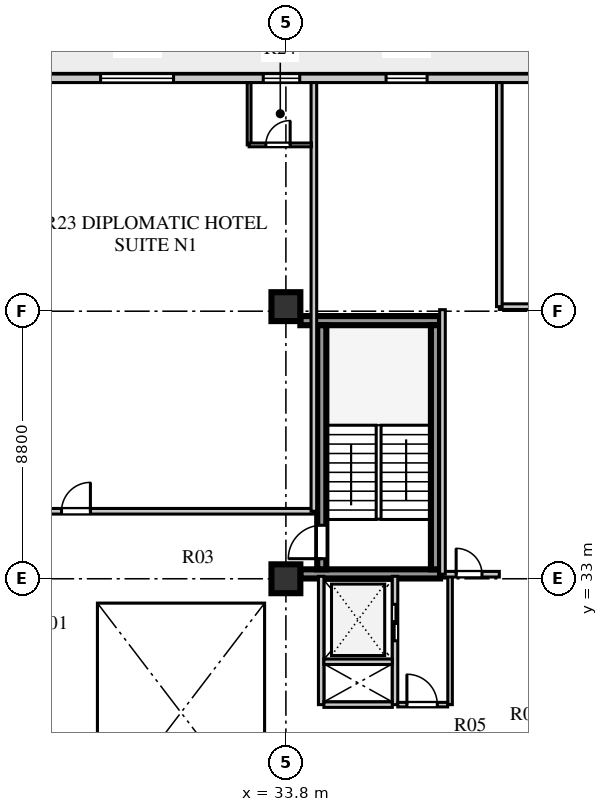
"""IFC4 building model, lengths in metres.
Left out: names, types, materials, properties, quantities, classifications, styles, units other than length and angle.
Written with IfcOpenShell. Run it as: python <this file> out.ifc"""

import sys

from ifc_helpers import new_model, si_unit, direction, frame, frame_2d, origin, origin_2d, place, context, subcontext, project, spatial, rectangle, extrude, element, fill, save


model = new_model("IFC4")
c1 = context("Model", 3, precision=1e-05, world=origin(), true_north=direction((0.0, 1.0)))
c2 = subcontext(c1, "Body", "Model", "MODEL_VIEW")
j1 = project(units=[si_unit("LENGTHUNIT", "METRE"), si_unit("PLANEANGLEUNIT", "RADIAN")], contexts=[c1])
p1 = place(None, origin())
s1 = spatial("IfcSite", under=j1, at=p1, CompositionType="ELEMENT")
p2 = place(p1, origin())
s2 = spatial("IfcBuilding", under=s1, at=p2, CompositionType="ELEMENT")
p3 = place(p2, frame((0.0, 0.0, 157.9)))
s3 = spatial("IfcBuildingStorey", under=s2, at=p3, CompositionType="ELEMENT", Elevation=157.9)
for number, where, z_axis, x_axis in (
    (1, (34.275, 33.16, 0.0), (0.0, 0.0, 1.0), (1.0, 0.0, 0.0)),
    (2, (34.275, 41.49, 0.0), (0.0, 0.0, 1.0), (1.0, 0.0, 0.0)),
):
    element("IfcWall", number, at=place(p3, frame(where, z_axis=z_axis, x_axis=x_axis)), inside=s3, PredefinedType="SHEAR", context=c2, shape_type="SweptSolid", body=[
        extrude(rectangle(XDim=4.595, YDim=0.3, at=frame_2d((2.298, 0.0))), origin(), (0.0, 0.0, 1.0), 3.6),
    ])
p4 = place(p3, frame((34.98, 33.31, 0.0), z_axis=(0.0, 0.0, 1.0), x_axis=(0.0, 1.0, 0.0)))
e3 = element("IfcWall", 3, at=p4, inside=s3, PredefinedType="SHEAR", context=c2, shape_type="SweptSolid", body=[
    extrude(rectangle(XDim=8.03, YDim=0.3, at=frame_2d((4.015, 0.0))), origin(), (0.0, 0.0, 1.0), 3.6),
])
p5 = place(p4, frame((0.35, 0.0, 0.0)))
e4 = element("IfcOpeningElement", 4, at=p5, cuts=e3, PredefinedType="OPENING", context=c2, shape_type="SweptSolid", body=[
    extrude(rectangle(XDim=1.1, YDim=2.1, at=frame_2d((0.55, 1.05))), frame((0.0, 0.16, 0.0), z_axis=(0.0, -1.0, 0.0), x_axis=(1.0, 0.0, 0.0)), (0.0, 0.0, 1.0), 0.32),
])
p6 = place(p3, frame((38.72, 33.31, 0.0), z_axis=(0.0, 0.0, 1.0), x_axis=(0.0, 1.0, 0.0)))
e5 = element("IfcWall", 5, at=p6, inside=s3, PredefinedType="SHEAR", context=c2, shape_type="SweptSolid", body=[
    extrude(rectangle(XDim=8.03, YDim=0.3, at=frame_2d((4.015, 0.0))), origin(), (0.0, 0.0, 1.0), 3.6),
])
for number, where, z_axis, x_axis in (
    (6, (33.8, 33.0, 0.0), (0.0, 0.0, 1.0), (1.0, 0.0, 0.0)),
    (7, (33.8, 41.95, 0.0), (0.0, 0.0, 1.0), (1.0, 0.0, 0.0)),
):
    element("IfcColumn", number, at=place(p3, frame(where, z_axis=z_axis, x_axis=x_axis)), inside=s3, PredefinedType="COLUMN", context=c2, shape_type="SweptSolid", body=[
        extrude(rectangle(XDim=0.95, YDim=0.95, at=origin_2d()), origin(), (0.0, 0.0, 1.0), 3.6),
    ])
p7 = place(p3, frame((45.55, 49.46, 0.0), z_axis=(0.0, 0.0, 1.0), x_axis=(-1.0, 0.0, 0.0)))
e8 = element("IfcWall", 8, at=p7, inside=s3, PredefinedType="STANDARD", context=c2, shape_type="SweptSolid", body=[
    extrude(rectangle(XDim=32.5, YDim=0.28, at=frame_2d((16.25, 0.0))), origin(), (0.0, 0.0, 1.0), 3.6),
])
p8 = place(p7, frame((30.55, 0.0, 0.0)))
e9 = element("IfcOpeningElement", 9, at=p8, cuts=e8, PredefinedType="OPENING", context=c2, shape_type="SweptSolid", body=[
    extrude(rectangle(XDim=1.0, YDim=2.05, at=frame_2d((0.5, 1.025))), frame((0.0, 0.15, 0.0), z_axis=(0.0, -1.0, 0.0), x_axis=(1.0, 0.0, 0.0)), (0.0, 0.0, 1.0), 0.3),
])
p9 = place(p7, frame((24.87, 0.0, 0.8)))
e10 = element("IfcOpeningElement", 10, at=p9, cuts=e8, PredefinedType="OPENING", context=c2, shape_type="SweptSolid", body=[
    extrude(rectangle(XDim=1.2, YDim=1.75, at=frame_2d((0.6, 0.875))), frame((0.0, 0.15, 0.0), z_axis=(0.0, -1.0, 0.0), x_axis=(1.0, 0.0, 0.0)), (0.0, 0.0, 1.0), 0.3),
])
p10 = place(p7, frame((15.445, 0.0, 0.8)))
e11 = element("IfcOpeningElement", 11, at=p10, cuts=e8, PredefinedType="OPENING", context=c2, shape_type="SweptSolid", body=[
    extrude(rectangle(XDim=2.4, YDim=2.05, at=frame_2d((1.2, 1.025))), frame((0.0, 0.15, 0.0), z_axis=(0.0, -1.0, 0.0), x_axis=(1.0, 0.0, 0.0)), (0.0, 0.0, 1.0), 0.3),
])
p11 = place(p7, frame((11.295, 0.0, 0.8)))
e12 = element("IfcOpeningElement", 12, at=p11, cuts=e8, PredefinedType="OPENING", context=c2, shape_type="SweptSolid", body=[
    extrude(rectangle(XDim=1.2, YDim=1.75, at=frame_2d((0.6, 0.875))), frame((0.0, 0.15, 0.0), z_axis=(0.0, -1.0, 0.0), x_axis=(1.0, 0.0, 0.0)), (0.0, 0.0, 1.0), 0.3),
])
p12 = place(p7, frame((7.105, 0.0, 0.8)))
e13 = element("IfcOpeningElement", 13, at=p12, cuts=e8, PredefinedType="OPENING", context=c2, shape_type="SweptSolid", body=[
    extrude(rectangle(XDim=1.35, YDim=1.9, at=frame_2d((0.675, 0.95))), frame((0.0, 0.15, 0.0), z_axis=(0.0, -1.0, 0.0), x_axis=(1.0, 0.0, 0.0)), (0.0, 0.0, 1.0), 0.3),
])
p13 = place(p7, frame((1.595, 0.0, 0.8)))
e14 = element("IfcOpeningElement", 14, at=p13, cuts=e8, PredefinedType="OPENING", context=c2, shape_type="SweptSolid", body=[
    extrude(rectangle(XDim=1.65, YDim=1.95, at=frame_2d((0.825, 0.975))), frame((0.0, 0.15, 0.0), z_axis=(0.0, -1.0, 0.0), x_axis=(1.0, 0.0, 0.0)), (0.0, 0.0, 1.0), 0.3),
])
p14 = place(p3, frame((34.96, 28.86, 0.0), z_axis=(0.0, 0.0, 1.0), x_axis=(0.0, 1.0, 0.0)))
e15 = element("IfcWall", 15, at=p14, inside=s3, PredefinedType="SOLIDWALL", context=c2, shape_type="SweptSolid", body=[
    extrude(rectangle(XDim=4.22, YDim=0.18, at=frame_2d((2.11, 0.0))), origin(), (0.0, 0.0, 1.0), 3.6),
])
p15 = place(p3, frame((37.39, 28.86, 0.0), z_axis=(0.0, 0.0, 1.0), x_axis=(0.0, 1.0, 0.0)))
e16 = element("IfcWall", 16, at=p15, inside=s3, PredefinedType="SOLIDWALL", context=c2, shape_type="SweptSolid", body=[
    extrude(rectangle(XDim=4.22, YDim=0.18, at=frame_2d((2.11, 0.0))), origin(), (0.0, 0.0, 1.0), 3.6),
])
p16 = place(p15, frame((2.1, 0.0, 0.0)))
e17 = element("IfcOpeningElement", 17, at=p16, cuts=e16, PredefinedType="OPENING", context=c2, shape_type="SweptSolid", body=[
    extrude(rectangle(XDim=1.2, YDim=2.12, at=frame_2d((0.6, 1.06))), frame((0.0, 0.1, 0.0), z_axis=(0.0, -1.0, 0.0), x_axis=(1.0, 0.0, 0.0)), (0.0, 0.0, 1.0), 0.2),
])
for number, where, z_axis, x_axis in (
    (18, (35.05, 28.86, 0.0), (0.0, 0.0, 1.0), (1.0, 0.0, 0.0)),
    (19, (35.05, 30.27, 0.0), (0.0, 0.0, 1.0), (1.0, 0.0, 0.0)),
):
    element("IfcWall", number, at=place(p3, frame(where, z_axis=z_axis, x_axis=x_axis)), inside=s3, PredefinedType="SOLIDWALL", context=c2, shape_type="SweptSolid", body=[
        extrude(rectangle(XDim=2.25, YDim=0.18, at=frame_2d((1.125, 0.0))), origin(), (0.0, 0.0, 1.0), 3.6),
    ])
p17 = place(p3, frame((39.2, 28.86, 0.0), z_axis=(0.0, 0.0, 1.0), x_axis=(0.0, 1.0, 0.0)))
e20 = element("IfcWall", 20, at=p17, inside=s3, PredefinedType="PARTITIONING", context=c2, shape_type="SweptSolid", body=[
    extrude(rectangle(XDim=4.22, YDim=0.15, at=frame_2d((2.11, 0.0))), origin(), (0.0, 0.0, 1.0), 3.6),
])
p18 = place(p3, frame((37.48, 28.86, 0.0), z_axis=(0.0, 0.0, 1.0), x_axis=(1.0, 0.0, 0.0)))
e21 = element("IfcWall", 21, at=p18, inside=s3, PredefinedType="PARTITIONING", context=c2, shape_type="SweptSolid", body=[
    extrude(rectangle(XDim=1.64, YDim=0.15, at=frame_2d((0.82, 0.0))), origin(), (0.0, 0.0, 1.0), 3.6),
])
p19 = place(p18, frame((0.3, 0.0, 0.0)))
e22 = element("IfcOpeningElement", 22, at=p19, cuts=e21, PredefinedType="OPENING", context=c2, shape_type="SweptSolid", body=[
    extrude(rectangle(XDim=1.0, YDim=2.1, at=frame_2d((0.5, 1.05))), frame((0.0, 0.085, 0.0), z_axis=(0.0, -1.0, 0.0), x_axis=(1.0, 0.0, 0.0)), (0.0, 0.0, 1.0), 0.17),
])
p20 = place(p3, frame((25.22, 35.22, 0.0), z_axis=(0.0, 0.0, 1.0), x_axis=(1.0, 0.0, 0.0)))
e23 = element("IfcWall", 23, at=p20, inside=s3, PredefinedType="SOLIDWALL", context=c2, shape_type="SweptSolid", body=[
    extrude(rectangle(XDim=9.5, YDim=0.185, at=frame_2d((4.75, 0.0))), origin(), (0.0, 0.0, 1.0), 3.6),
])
p21 = place(p20, frame((1.2, 0.0, 0.0)))
e24 = element("IfcOpeningElement", 24, at=p21, cuts=e23, PredefinedType="OPENING", context=c2, shape_type="SweptSolid", body=[
    extrude(rectangle(XDim=0.95, YDim=2.1, at=frame_2d((0.475, 1.05))), frame((0.0, 0.103, 0.0), z_axis=(0.0, -1.0, 0.0), x_axis=(1.0, 0.0, 0.0)), (0.0, 0.0, 1.0), 0.205),
])
p22 = place(p3, frame((40.82, 41.95, 0.0), z_axis=(0.0, 0.0, 1.0), x_axis=(1.0, 0.0, 0.0)))
e25 = element("IfcWall", 25, at=p22, inside=s3, PredefinedType="SOLIDWALL", context=c2, shape_type="SweptSolid", body=[
    extrude(rectangle(XDim=9.7, YDim=0.185, at=frame_2d((4.85, 0.0))), origin(), (0.0, 0.0, 1.0), 2.95),
])
p23 = place(p3, frame((34.72, 35.22, 0.0), z_axis=(0.0, 0.0, 1.0), x_axis=(0.0, 1.0, 0.0)))
e26 = element("IfcWall", 26, at=p23, inside=s3, PredefinedType="SOLIDWALL", context=c2, shape_type="SweptSolid", body=[
    extrude(rectangle(XDim=14.1, YDim=0.185, at=frame_2d((7.05, 0.0))), origin(), (0.0, 0.0, 1.0), 3.6),
])
p24 = place(p3, frame((32.59, 47.27, 0.0), z_axis=(0.0, 0.0, 1.0), x_axis=(0.0, 1.0, 0.0)))
e27 = element("IfcWall", 27, at=p24, inside=s3, PredefinedType="PLUMBINGWALL", context=c2, shape_type="SweptSolid", body=[
    extrude(rectangle(XDim=2.05, YDim=0.125, at=frame_2d((1.025, 0.0))), origin(), (0.0, 0.0, 1.0), 3.6),
])
p25 = place(p3, frame((32.59, 47.27, 0.0), z_axis=(0.0, 0.0, 1.0), x_axis=(1.0, 0.0, 0.0)))
e28 = element("IfcWall", 28, at=p25, inside=s3, PredefinedType="PLUMBINGWALL", context=c2, shape_type="SweptSolid", body=[
    extrude(rectangle(XDim=2.05, YDim=0.125, at=frame_2d((1.025, 0.0))), origin(), (0.0, 0.0, 1.0), 3.6),
])
p26 = place(p25, frame((0.55, 0.0, 0.0)))
e29 = element("IfcOpeningElement", 29, at=p26, cuts=e28, PredefinedType="OPENING", context=c2, shape_type="SweptSolid", body=[
    extrude(rectangle(XDim=0.8, YDim=2.05, at=frame_2d((0.4, 1.025))), frame((0.0, 0.073, 0.0), z_axis=(0.0, -1.0, 0.0), x_axis=(1.0, 0.0, 0.0)), (0.0, 0.0, 1.0), 0.145),
])
p27 = place(p3, frame((38.95, 33.15, 0.0), z_axis=(0.0, 0.0, 1.0), x_axis=(1.0, 0.0, 0.0)))
e30 = element("IfcWall", 30, at=p27, inside=s3, PredefinedType="SOLIDWALL", context=c2, shape_type="SweptSolid", body=[
    extrude(rectangle(XDim=1.87, YDim=0.185, at=frame_2d((0.935, 0.0))), origin(), (0.0, 0.0, 1.0), 3.6),
])
p28 = place(p27, frame((0.45, 0.0, 0.0)))
e31 = element("IfcOpeningElement", 31, at=p28, cuts=e30, PredefinedType="OPENING", context=c2, shape_type="SweptSolid", body=[
    extrude(rectangle(XDim=0.85, YDim=2.05, at=frame_2d((0.425, 1.025))), frame((0.0, 0.103, 0.0), z_axis=(0.0, -1.0, 0.0), x_axis=(1.0, 0.0, 0.0)), (0.0, 0.0, 1.0), 0.205),
])
p29 = place(p3, frame((38.95, 33.15, 0.0), z_axis=(0.0, 0.0, 1.0), x_axis=(0.0, 1.0, 0.0)))
e32 = element("IfcWall", 32, at=p29, inside=s3, PredefinedType="SOLIDWALL", context=c2, shape_type="SweptSolid", body=[
    extrude(rectangle(XDim=8.7, YDim=0.185, at=frame_2d((4.35, 0.0))), origin(), (0.0, 0.0, 1.0), 3.6),
])
p30 = place(p3, frame((40.82, 41.95, 0.0), z_axis=(0.0, 0.0, 1.0), x_axis=(0.0, 1.0, 0.0)))
e33 = element("IfcWall", 33, at=p30, inside=s3, PredefinedType="SOLIDWALL", context=c2, shape_type="SweptSolid", body=[
    extrude(rectangle(XDim=7.37, YDim=0.185, at=frame_2d((3.685, 0.0))), origin(), (0.0, 0.0, 1.0), 3.6),
])
p31 = place(p10, origin())
e34 = element("IfcWindow", 34, at=p31, inside=s3, PartitioningType="SINGLE_PANEL", PredefinedType="WINDOW", context=c2, shape_type="SweptSolid", body=[
    extrude(rectangle(XDim=2.4, YDim=2.05, at=frame_2d((1.2, 1.025))), frame((0.0, 0.03, 0.0), z_axis=(0.0, -1.0, 0.0), x_axis=(1.0, 0.0, 0.0)), (0.0, 0.0, 1.0), 0.06),
])
fill(e11, e34)
p32 = place(p11, origin())
e35 = element("IfcWindow", 35, at=p32, inside=s3, PartitioningType="SINGLE_PANEL", PredefinedType="WINDOW", context=c2, shape_type="SweptSolid", body=[
    extrude(rectangle(XDim=1.2, YDim=1.75, at=frame_2d((0.6, 0.875))), frame((0.0, 0.03, 0.0), z_axis=(0.0, -1.0, 0.0), x_axis=(1.0, 0.0, 0.0)), (0.0, 0.0, 1.0), 0.06),
])
fill(e12, e35)
p33 = place(p12, origin())
e36 = element("IfcWindow", 36, at=p33, inside=s3, PartitioningType="SINGLE_PANEL", PredefinedType="WINDOW", context=c2, shape_type="SweptSolid", body=[
    extrude(rectangle(XDim=1.35, YDim=1.9, at=frame_2d((0.675, 0.95))), frame((0.0, 0.03, 0.0), z_axis=(0.0, -1.0, 0.0), x_axis=(1.0, 0.0, 0.0)), (0.0, 0.0, 1.0), 0.06),
])
fill(e13, e36)
p34 = place(p5, origin())
e37 = element("IfcDoor", 37, at=p34, inside=s3, OperationType="SINGLE_SWING_LEFT", PredefinedType="DOOR", context=c2, shape_type="SweptSolid", body=[
    extrude(rectangle(XDim=1.1, YDim=2.1, at=frame_2d((0.55, 1.05))), frame((0.0, 0.025, 0.0), z_axis=(0.0, -1.0, 0.0), x_axis=(1.0, 0.0, 0.0)), (0.0, 0.0, 1.0), 0.05),
])
fill(e4, e37)
p35 = place(p16, frame((1.2, 0.0, 0.0), z_axis=(0.0, 0.0, 1.0), x_axis=(-1.0, 0.0, 0.0)))
e38 = element("IfcDoor", 38, at=p35, inside=s3, OperationType="DOUBLE_DOOR_SLIDING", PredefinedType="DOOR", context=c2, shape_type="SweptSolid", body=[
    extrude(rectangle(XDim=1.2, YDim=2.12, at=frame_2d((0.6, 1.06))), frame((0.0, 0.025, 0.0), z_axis=(0.0, -1.0, 0.0), x_axis=(1.0, 0.0, 0.0)), (0.0, 0.0, 1.0), 0.05),
])
fill(e17, e38)
p36 = place(p19, origin())
e39 = element("IfcDoor", 39, at=p36, inside=s3, OperationType="SINGLE_SWING_LEFT", PredefinedType="DOOR", context=c2, shape_type="SweptSolid", body=[
    extrude(rectangle(XDim=1.0, YDim=2.1, at=frame_2d((0.5, 1.05))), frame((0.0, 0.025, 0.0), z_axis=(0.0, -1.0, 0.0), x_axis=(1.0, 0.0, 0.0)), (0.0, 0.0, 1.0), 0.05),
])
fill(e22, e39)
p37 = place(p21, origin())
e40 = element("IfcDoor", 40, at=p37, inside=s3, OperationType="SINGLE_SWING_RIGHT", PredefinedType="DOOR", context=c2, shape_type="SweptSolid", body=[
    extrude(rectangle(XDim=0.95, YDim=2.1, at=frame_2d((0.475, 1.05))), frame((0.0, 0.025, 0.0), z_axis=(0.0, -1.0, 0.0), x_axis=(1.0, 0.0, 0.0)), (0.0, 0.0, 1.0), 0.05),
])
fill(e24, e40)
p38 = place(p26, frame((0.8, 0.0, 0.0), z_axis=(0.0, 0.0, 1.0), x_axis=(-1.0, 0.0, 0.0)))
e41 = element("IfcDoor", 41, at=p38, inside=s3, OperationType="SINGLE_SWING_LEFT", PredefinedType="DOOR", context=c2, shape_type="SweptSolid", body=[
    extrude(rectangle(XDim=0.8, YDim=2.05, at=frame_2d((0.4, 1.025))), frame((0.0, 0.025, 0.0), z_axis=(0.0, -1.0, 0.0), x_axis=(1.0, 0.0, 0.0)), (0.0, 0.0, 1.0), 0.05),
])
fill(e29, e41)
p39 = place(p28, origin())
e42 = element("IfcDoor", 42, at=p39, inside=s3, OperationType="SINGLE_SWING_LEFT", PredefinedType="DOOR", context=c2, shape_type="SweptSolid", body=[
    extrude(rectangle(XDim=0.85, YDim=2.05, at=frame_2d((0.425, 1.025))), frame((0.0, 0.025, 0.0), z_axis=(0.0, -1.0, 0.0), x_axis=(1.0, 0.0, 0.0)), (0.0, 0.0, 1.0), 0.05),
])
fill(e31, e42)
save(model, sys.argv[1])
